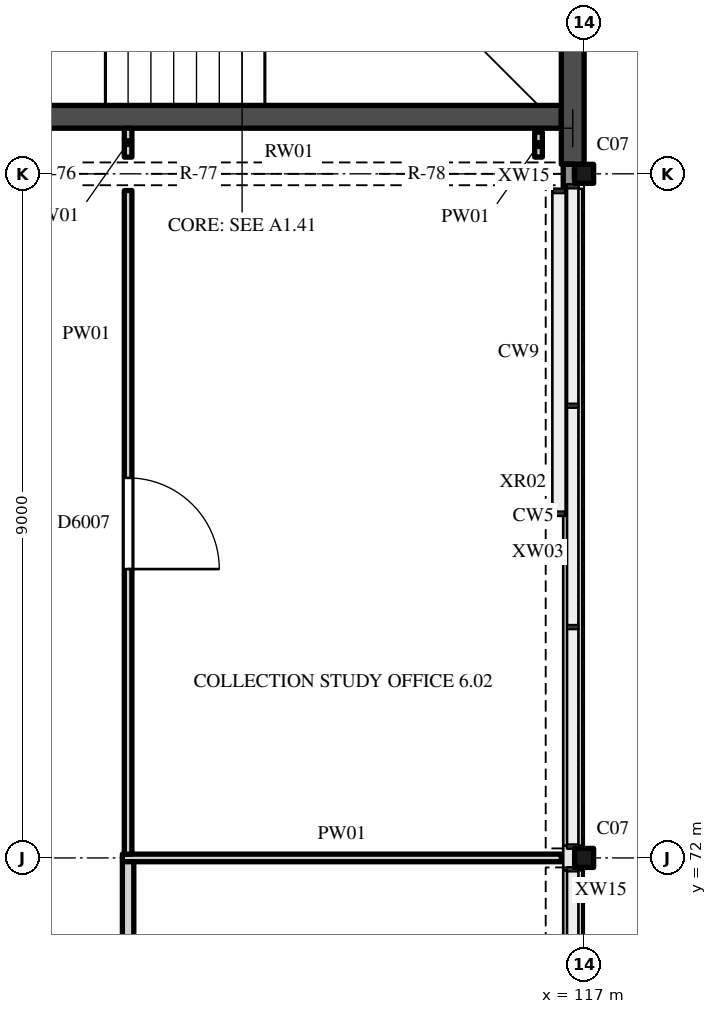
"""IFC4 building model, lengths in metres.
Left out: names, types, materials, properties, quantities, classifications, styles, units other than length and angle.
Written with IfcOpenShell. Run it as: python <this file> out.ifc"""

import sys

from ifc_helpers import new_model, si_unit, direction, frame, frame_2d, origin, origin_2d, place, context, subcontext, project, spatial, polyline, rectangle, hollow_rectangle, outline, extrude, element, fill, save


model = new_model("IFC4")
c1 = context("Model", 3, precision=1e-05, world=origin(), true_north=direction((0.0, 1.0)))
c2 = subcontext(c1, "Body", "Model", "MODEL_VIEW")
j1 = project(units=[si_unit("LENGTHUNIT", "METRE"), si_unit("PLANEANGLEUNIT", "RADIAN")], contexts=[c1])
p1 = place(None, origin())
s1 = spatial("IfcSite", under=j1, at=p1, CompositionType="ELEMENT")
p2 = place(p1, origin())
s2 = spatial("IfcBuilding", under=s1, at=p2, CompositionType="ELEMENT")
p3 = place(p2, frame((0.0, 0.0, 36.0)))
s3 = spatial("IfcBuildingStorey", under=s2, at=p3, CompositionType="ELEMENT", Elevation=36.0)
for number, where, z_axis, x_axis in (
    (1, (117.0, 72.0, 0.0), (0.0, 0.0, 1.0), (1.0, 0.0, 0.0)),
    (2, (117.0, 81.0, 0.0), (0.0, 0.0, 1.0), (1.0, 0.0, 0.0)),
):
    element("IfcColumn", number, at=place(p3, frame(where, z_axis=z_axis, x_axis=x_axis)), inside=s3, PredefinedType="COLUMN", context=c2, shape_type="SweptSolid", body=[
        extrude(hollow_rectangle(XDim=0.25, YDim=0.25, WallThickness=0.009, InnerFilletRadius=0.013, OuterFilletRadius=0.022, at=origin_2d()), origin(), (0.0, 0.0, 1.0), 8.0),
    ])
p4 = place(p3, frame((108.6, 81.75, 0.0), z_axis=(0.0, 0.0, 1.0), x_axis=(1.0, 0.0, 0.0)))
e3 = element("IfcWall", 3, at=p4, inside=s3, PredefinedType="SHEAR", context=c2, shape_type="SweptSolid", body=[
    extrude(rectangle(XDim=8.1, YDim=0.3, at=frame_2d((4.05, 0.0))), origin(), (0.0, 0.0, 1.0), 14.344),
])
p5 = place(p3, frame((116.85, 81.125, 0.0), z_axis=(0.0, 0.0, 1.0), x_axis=(0.0, 1.0, 0.0)))
e4 = element("IfcWall", 4, at=p5, inside=s3, PredefinedType="SHEAR", context=c2, shape_type="SweptSolid", body=[
    extrude(outline(polyline([(0.0, 0.0), (8.711, 0.0), (8.711, 7.875), (0.0, 14.844), (0.0, 0.0)])), frame((0.0, 0.15, 0.0), z_axis=(0.0, -1.0, 0.0), x_axis=(1.0, 0.0, 0.0)), (0.0, 0.0, 1.0), 0.3),
])
for number, where, z_axis, x_axis in (
    (5, (116.85, 63.197, 0.0), (0.0, 0.0, 1.0), (0.0, 1.0, 0.0)),
    (6, (116.85, 72.161, 0.0), (0.0, 0.0, 1.0), (0.0, 1.0, 0.0)),
):
    element("IfcWall", number, at=place(p3, frame(where, z_axis=z_axis, x_axis=x_axis)), inside=s3, PredefinedType="SOLIDWALL", context=c2, shape_type="SweptSolid", body=[
        extrude(rectangle(XDim=8.642, YDim=0.25, at=frame_2d((4.321, 0.0))), origin(), (0.0, 0.0, 1.0), 1.1),
    ])
p6 = place(p3, frame((116.8, 71.839, 0.0), z_axis=(0.0, 0.0, 1.0), x_axis=(0.0, 1.0, 0.0)))
e7 = element("IfcWall", 7, at=p6, inside=s3, PredefinedType="SOLIDWALL", context=c2, shape_type="SweptSolid", body=[
    extrude(rectangle(XDim=0.322, YDim=0.15, at=frame_2d((0.161, 0.0))), origin(), (0.0, 0.0, 1.0), 1.1),
])
p7 = place(p3, frame((116.8, 80.803, 0.0), z_axis=(0.0, 0.0, 1.0), x_axis=(0.0, 1.0, 0.0)))
e8 = element("IfcWall", 8, at=p7, inside=s3, PredefinedType="SOLIDWALL", context=c2, shape_type="SweptSolid", body=[
    extrude(rectangle(XDim=0.322, YDim=0.15, at=frame_2d((0.161, 0.0))), origin(), (0.0, 0.0, 1.0), 14.844),
])
p8 = place(p3, frame((54.15, 81.0, 15.2), z_axis=(0.0, 0.0, 1.0), x_axis=(1.0, 0.0, 0.0)))
e9 = element("IfcWall", 9, at=p8, inside=s3, PredefinedType="SOLIDWALL", context=c2, shape_type="SweptSolid", body=[
    extrude(rectangle(XDim=62.7, YDim=0.3, at=frame_2d((31.35, 0.0))), origin(), (0.0, 0.0, 1.0), 0.9),
])
p9 = place(p8, frame((0.15, 0.0, 0.15)))
e10 = element("IfcOpeningElement", 10, at=p9, cuts=e9, PredefinedType="OPENING", context=c2, shape_type="SweptSolid", body=[
    extrude(rectangle(XDim=2.4, YDim=0.6, at=frame_2d((1.2, 0.3))), frame((0.0, 0.16, 0.0), z_axis=(0.0, -1.0, 0.0), x_axis=(1.0, 0.0, 0.0)), (0.0, 0.0, 1.0), 0.32),
])
p10 = place(p8, frame((3.15, 0.0, 0.15)))
e11 = element("IfcOpeningElement", 11, at=p10, cuts=e9, PredefinedType="OPENING", context=c2, shape_type="SweptSolid", body=[
    extrude(rectangle(XDim=2.4, YDim=0.6, at=frame_2d((1.2, 0.3))), frame((0.0, 0.16, 0.0), z_axis=(0.0, -1.0, 0.0), x_axis=(1.0, 0.0, 0.0)), (0.0, 0.0, 1.0), 0.32),
])
p11 = place(p8, frame((6.15, 0.0, 0.15)))
e12 = element("IfcOpeningElement", 12, at=p11, cuts=e9, PredefinedType="OPENING", context=c2, shape_type="SweptSolid", body=[
    extrude(rectangle(XDim=2.4, YDim=0.6, at=frame_2d((1.2, 0.3))), frame((0.0, 0.16, 0.0), z_axis=(0.0, -1.0, 0.0), x_axis=(1.0, 0.0, 0.0)), (0.0, 0.0, 1.0), 0.32),
])
p12 = place(p8, frame((9.15, 0.0, 0.15)))
e13 = element("IfcOpeningElement", 13, at=p12, cuts=e9, PredefinedType="OPENING", context=c2, shape_type="SweptSolid", body=[
    extrude(rectangle(XDim=2.4, YDim=0.6, at=frame_2d((1.2, 0.3))), frame((0.0, 0.16, 0.0), z_axis=(0.0, -1.0, 0.0), x_axis=(1.0, 0.0, 0.0)), (0.0, 0.0, 1.0), 0.32),
])
p13 = place(p8, frame((12.15, 0.0, 0.15)))
e14 = element("IfcOpeningElement", 14, at=p13, cuts=e9, PredefinedType="OPENING", context=c2, shape_type="SweptSolid", body=[
    extrude(rectangle(XDim=2.4, YDim=0.6, at=frame_2d((1.2, 0.3))), frame((0.0, 0.16, 0.0), z_axis=(0.0, -1.0, 0.0), x_axis=(1.0, 0.0, 0.0)), (0.0, 0.0, 1.0), 0.32),
])
p14 = place(p8, frame((15.15, 0.0, 0.15)))
e15 = element("IfcOpeningElement", 15, at=p14, cuts=e9, PredefinedType="OPENING", context=c2, shape_type="SweptSolid", body=[
    extrude(rectangle(XDim=2.4, YDim=0.6, at=frame_2d((1.2, 0.3))), frame((0.0, 0.16, 0.0), z_axis=(0.0, -1.0, 0.0), x_axis=(1.0, 0.0, 0.0)), (0.0, 0.0, 1.0), 0.32),
])
p15 = place(p8, frame((18.15, 0.0, 0.15)))
e16 = element("IfcOpeningElement", 16, at=p15, cuts=e9, PredefinedType="OPENING", context=c2, shape_type="SweptSolid", body=[
    extrude(rectangle(XDim=2.4, YDim=0.6, at=frame_2d((1.2, 0.3))), frame((0.0, 0.16, 0.0), z_axis=(0.0, -1.0, 0.0), x_axis=(1.0, 0.0, 0.0)), (0.0, 0.0, 1.0), 0.32),
])
p16 = place(p8, frame((21.15, 0.0, 0.15)))
e17 = element("IfcOpeningElement", 17, at=p16, cuts=e9, PredefinedType="OPENING", context=c2, shape_type="SweptSolid", body=[
    extrude(rectangle(XDim=2.4, YDim=0.6, at=frame_2d((1.2, 0.3))), frame((0.0, 0.16, 0.0), z_axis=(0.0, -1.0, 0.0), x_axis=(1.0, 0.0, 0.0)), (0.0, 0.0, 1.0), 0.32),
])
p17 = place(p8, frame((24.15, 0.0, 0.15)))
e18 = element("IfcOpeningElement", 18, at=p17, cuts=e9, PredefinedType="OPENING", context=c2, shape_type="SweptSolid", body=[
    extrude(rectangle(XDim=2.4, YDim=0.6, at=frame_2d((1.2, 0.3))), frame((0.0, 0.16, 0.0), z_axis=(0.0, -1.0, 0.0), x_axis=(1.0, 0.0, 0.0)), (0.0, 0.0, 1.0), 0.32),
])
p18 = place(p8, frame((27.15, 0.0, 0.15)))
e19 = element("IfcOpeningElement", 19, at=p18, cuts=e9, PredefinedType="OPENING", context=c2, shape_type="SweptSolid", body=[
    extrude(rectangle(XDim=2.4, YDim=0.6, at=frame_2d((1.2, 0.3))), frame((0.0, 0.16, 0.0), z_axis=(0.0, -1.0, 0.0), x_axis=(1.0, 0.0, 0.0)), (0.0, 0.0, 1.0), 0.32),
])
p19 = place(p8, frame((30.15, 0.0, 0.15)))
e20 = element("IfcOpeningElement", 20, at=p19, cuts=e9, PredefinedType="OPENING", context=c2, shape_type="SweptSolid", body=[
    extrude(rectangle(XDim=2.4, YDim=0.6, at=frame_2d((1.2, 0.3))), frame((0.0, 0.16, 0.0), z_axis=(0.0, -1.0, 0.0), x_axis=(1.0, 0.0, 0.0)), (0.0, 0.0, 1.0), 0.32),
])
p20 = place(p8, frame((33.15, 0.0, 0.15)))
e21 = element("IfcOpeningElement", 21, at=p20, cuts=e9, PredefinedType="OPENING", context=c2, shape_type="SweptSolid", body=[
    extrude(rectangle(XDim=2.4, YDim=0.6, at=frame_2d((1.2, 0.3))), frame((0.0, 0.16, 0.0), z_axis=(0.0, -1.0, 0.0), x_axis=(1.0, 0.0, 0.0)), (0.0, 0.0, 1.0), 0.32),
])
p21 = place(p8, frame((36.15, 0.0, 0.15)))
e22 = element("IfcOpeningElement", 22, at=p21, cuts=e9, PredefinedType="OPENING", context=c2, shape_type="SweptSolid", body=[
    extrude(rectangle(XDim=2.4, YDim=0.6, at=frame_2d((1.2, 0.3))), frame((0.0, 0.16, 0.0), z_axis=(0.0, -1.0, 0.0), x_axis=(1.0, 0.0, 0.0)), (0.0, 0.0, 1.0), 0.32),
])
p22 = place(p8, frame((39.15, 0.0, 0.15)))
e23 = element("IfcOpeningElement", 23, at=p22, cuts=e9, PredefinedType="OPENING", context=c2, shape_type="SweptSolid", body=[
    extrude(rectangle(XDim=2.4, YDim=0.6, at=frame_2d((1.2, 0.3))), frame((0.0, 0.16, 0.0), z_axis=(0.0, -1.0, 0.0), x_axis=(1.0, 0.0, 0.0)), (0.0, 0.0, 1.0), 0.32),
])
p23 = place(p8, frame((42.15, 0.0, 0.15)))
e24 = element("IfcOpeningElement", 24, at=p23, cuts=e9, PredefinedType="OPENING", context=c2, shape_type="SweptSolid", body=[
    extrude(rectangle(XDim=2.4, YDim=0.6, at=frame_2d((1.2, 0.3))), frame((0.0, 0.16, 0.0), z_axis=(0.0, -1.0, 0.0), x_axis=(1.0, 0.0, 0.0)), (0.0, 0.0, 1.0), 0.32),
])
p24 = place(p8, frame((45.15, 0.0, 0.15)))
e25 = element("IfcOpeningElement", 25, at=p24, cuts=e9, PredefinedType="OPENING", context=c2, shape_type="SweptSolid", body=[
    extrude(rectangle(XDim=2.4, YDim=0.6, at=frame_2d((1.2, 0.3))), frame((0.0, 0.16, 0.0), z_axis=(0.0, -1.0, 0.0), x_axis=(1.0, 0.0, 0.0)), (0.0, 0.0, 1.0), 0.32),
])
p25 = place(p8, frame((48.15, 0.0, 0.15)))
e26 = element("IfcOpeningElement", 26, at=p25, cuts=e9, PredefinedType="OPENING", context=c2, shape_type="SweptSolid", body=[
    extrude(rectangle(XDim=2.4, YDim=0.6, at=frame_2d((1.2, 0.3))), frame((0.0, 0.16, 0.0), z_axis=(0.0, -1.0, 0.0), x_axis=(1.0, 0.0, 0.0)), (0.0, 0.0, 1.0), 0.32),
])
p26 = place(p8, frame((51.15, 0.0, 0.15)))
e27 = element("IfcOpeningElement", 27, at=p26, cuts=e9, PredefinedType="OPENING", context=c2, shape_type="SweptSolid", body=[
    extrude(rectangle(XDim=2.4, YDim=0.6, at=frame_2d((1.2, 0.3))), frame((0.0, 0.16, 0.0), z_axis=(0.0, -1.0, 0.0), x_axis=(1.0, 0.0, 0.0)), (0.0, 0.0, 1.0), 0.32),
])
p27 = place(p8, frame((54.15, 0.0, 0.15)))
e28 = element("IfcOpeningElement", 28, at=p27, cuts=e9, PredefinedType="OPENING", context=c2, shape_type="SweptSolid", body=[
    extrude(rectangle(XDim=2.4, YDim=0.6, at=frame_2d((1.2, 0.3))), frame((0.0, 0.16, 0.0), z_axis=(0.0, -1.0, 0.0), x_axis=(1.0, 0.0, 0.0)), (0.0, 0.0, 1.0), 0.32),
])
p28 = place(p8, frame((57.15, 0.0, 0.15)))
e29 = element("IfcOpeningElement", 29, at=p28, cuts=e9, PredefinedType="OPENING", context=c2, shape_type="SweptSolid", body=[
    extrude(rectangle(XDim=2.4, YDim=0.6, at=frame_2d((1.2, 0.3))), frame((0.0, 0.16, 0.0), z_axis=(0.0, -1.0, 0.0), x_axis=(1.0, 0.0, 0.0)), (0.0, 0.0, 1.0), 0.32),
])
p29 = place(p8, frame((60.15, 0.0, 0.15)))
e30 = element("IfcOpeningElement", 30, at=p29, cuts=e9, PredefinedType="OPENING", context=c2, shape_type="SweptSolid", body=[
    extrude(rectangle(XDim=2.4, YDim=0.6, at=frame_2d((1.2, 0.3))), frame((0.0, 0.16, 0.0), z_axis=(0.0, -1.0, 0.0), x_axis=(1.0, 0.0, 0.0)), (0.0, 0.0, 1.0), 0.32),
])
p30 = place(p3, frame((116.669, 67.5, 7.8), z_axis=(0.0, 0.0, 1.0), x_axis=(0.0, 1.0, 0.0)))
e31 = element("IfcWall", 31, at=p30, inside=s3, PredefinedType="SOLIDWALL", context=c2, shape_type="SweptSolid", body=[
    extrude(outline(polyline([(0.0, 0.0), (4.375, 0.0), (4.375, 0.044), (0.0, 3.544), (0.0, 0.0)])), frame((0.0, 0.175, 0.0), z_axis=(0.0, -1.0, 0.0), x_axis=(1.0, 0.0, 0.0)), (0.0, 0.0, 1.0), 0.35),
])
p31 = place(p3, frame((116.669, 72.125, 7.8), z_axis=(0.0, 0.0, 1.0), x_axis=(0.0, 1.0, 0.0)))
e32 = element("IfcWall", 32, at=p31, inside=s3, PredefinedType="SOLIDWALL", context=c2, shape_type="SweptSolid", body=[
    extrude(outline(polyline([(0.0, 0.0), (4.375, 0.0), (4.375, 3.544), (0.0, 0.044), (0.0, 0.0)])), frame((0.0, 0.175, 0.0), z_axis=(0.0, -1.0, 0.0), x_axis=(1.0, 0.0, 0.0)), (0.0, 0.0, 1.0), 0.35),
])
p32 = place(p3, frame((116.669, 76.5, 11.0), z_axis=(0.0, 0.0, 1.0), x_axis=(0.0, 1.0, 0.0)))
e33 = element("IfcWall", 33, at=p32, inside=s3, PredefinedType="SOLIDWALL", context=c2, shape_type="SweptSolid", body=[
    extrude(outline(polyline([(0.0, 0.0), (4.303, 0.0), (4.303, 3.786), (0.0, 0.344), (0.0, 0.0)])), frame((0.0, 0.175, 0.0), z_axis=(0.0, -1.0, 0.0), x_axis=(1.0, 0.0, 0.0)), (0.0, 0.0, 1.0), 0.35),
])
p33 = place(p3, frame((110.925, 72.0, 0.0), z_axis=(0.0, 0.0, 1.0), x_axis=(1.0, 0.0, 0.0)))
e34 = element("IfcWall", 34, at=p33, inside=s3, PredefinedType="PARTITIONING", context=c2, shape_type="SweptSolid", body=[
    extrude(rectangle(XDim=5.775, YDim=0.1, at=frame_2d((2.887, 0.0))), origin(), (0.0, 0.0, 1.0), 7.366),
])
p34 = place(p3, frame((111.0, 63.22, 0.0), z_axis=(0.0, 0.0, 1.0), x_axis=(0.0, 1.0, 0.0)))
e35 = element("IfcWall", 35, at=p34, inside=s3, PredefinedType="PARTITIONING", context=c2, shape_type="SweptSolid", body=[
    extrude(rectangle(XDim=8.73, YDim=0.15, at=frame_2d((4.365, 0.0))), origin(), (0.0, 0.0, 1.0), 7.744),
])
p35 = place(p34, frame((3.65, 0.0, 0.0)))
e36 = element("IfcOpeningElement", 36, at=p35, cuts=e35, PredefinedType="OPENING", context=c2, shape_type="SweptSolid", body=[
    extrude(rectangle(XDim=1.5, YDim=2.1, at=frame_2d((0.75, 1.05))), frame((0.0, 0.085, 0.0), z_axis=(0.0, -1.0, 0.0), x_axis=(1.0, 0.0, 0.0)), (0.0, 0.0, 1.0), 0.17),
])
p36 = place(p3, frame((111.0, 72.05, 0.0), z_axis=(0.0, 0.0, 1.0), x_axis=(0.0, 1.0, 0.0)))
e37 = element("IfcWall", 37, at=p36, inside=s3, PredefinedType="PARTITIONING", context=c2, shape_type="SweptSolid", body=[
    extrude(rectangle(XDim=8.73, YDim=0.1, at=frame_2d((4.365, 0.0))), origin(), (0.0, 0.0, 1.0), 7.744),
])
p37 = place(p36, frame((3.75, 0.0, 0.0)))
e38 = element("IfcOpeningElement", 38, at=p37, cuts=e37, PredefinedType="OPENING", context=c2, shape_type="SweptSolid", body=[
    extrude(rectangle(XDim=1.2, YDim=2.4, at=frame_2d((0.6, 1.2))), frame((0.0, 0.06, 0.0), z_axis=(0.0, -1.0, 0.0), x_axis=(1.0, 0.0, 0.0)), (0.0, 0.0, 1.0), 0.12),
])
p38 = place(p3, frame((111.0, 81.22, 0.0), z_axis=(0.0, 0.0, 1.0), x_axis=(0.0, 1.0, 0.0)))
e39 = element("IfcWall", 39, at=p38, inside=s3, PredefinedType="PARTITIONING", context=c2, shape_type="SweptSolid", body=[
    extrude(rectangle(XDim=0.38, YDim=0.1, at=frame_2d((0.19, 0.0))), origin(), (0.0, 0.0, 1.0), 7.744),
])
p39 = place(p3, frame((116.4, 81.22, 0.0), z_axis=(0.0, 0.0, 1.0), x_axis=(0.0, 1.0, 0.0)))
e40 = element("IfcWall", 40, at=p39, inside=s3, PredefinedType="PARTITIONING", context=c2, shape_type="SweptSolid", body=[
    extrude(rectangle(XDim=0.33, YDim=0.1, at=frame_2d((0.165, 0.0))), origin(), (0.0, 0.0, 1.0), 7.744),
])
p40 = place(p27, origin())
e41 = element("IfcWindow", 41, at=p40, inside=s3, PartitioningType="SINGLE_PANEL", PredefinedType="SKYLIGHT", context=c2, shape_type="SweptSolid", body=[
    extrude(rectangle(XDim=2.4, YDim=0.6, at=frame_2d((1.2, 0.3))), frame((0.0, 0.03, 0.0), z_axis=(0.0, -1.0, 0.0), x_axis=(1.0, 0.0, 0.0)), (0.0, 0.0, 1.0), 0.06),
])
fill(e28, e41)
p41 = place(p28, origin())
e42 = element("IfcWindow", 42, at=p41, inside=s3, PartitioningType="SINGLE_PANEL", PredefinedType="SKYLIGHT", context=c2, shape_type="SweptSolid", body=[
    extrude(rectangle(XDim=2.4, YDim=0.6, at=frame_2d((1.2, 0.3))), frame((0.0, 0.03, 0.0), z_axis=(0.0, -1.0, 0.0), x_axis=(1.0, 0.0, 0.0)), (0.0, 0.0, 1.0), 0.06),
])
fill(e29, e42)
p42 = place(p29, origin())
e43 = element("IfcWindow", 43, at=p42, inside=s3, PartitioningType="SINGLE_PANEL", PredefinedType="SKYLIGHT", context=c2, shape_type="SweptSolid", body=[
    extrude(rectangle(XDim=2.4, YDim=0.6, at=frame_2d((1.2, 0.3))), frame((0.0, 0.03, 0.0), z_axis=(0.0, -1.0, 0.0), x_axis=(1.0, 0.0, 0.0)), (0.0, 0.0, 1.0), 0.06),
])
fill(e30, e43)
p43 = place(p37, origin())
e44 = element("IfcDoor", 44, at=p43, inside=s3, OperationType="SINGLE_SWING_LEFT", PredefinedType="DOOR", context=c2, shape_type="SweptSolid", body=[
    extrude(rectangle(XDim=1.2, YDim=2.4, at=frame_2d((0.6, 1.2))), frame((0.0, 0.025, 0.0), z_axis=(0.0, -1.0, 0.0), x_axis=(1.0, 0.0, 0.0)), (0.0, 0.0, 1.0), 0.05),
])
fill(e38, e44)
save(model, sys.argv[1])
